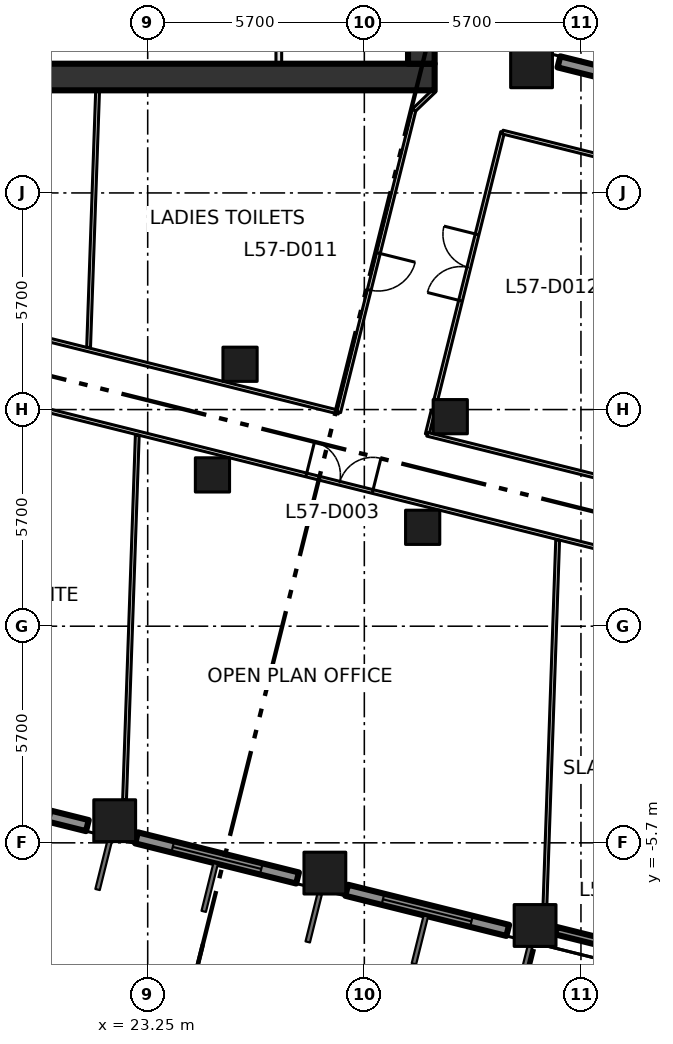
"""IFC4 building model, lengths in metres.
Left out: names, types, materials, properties, quantities, classifications, styles, units other than length and angle.
Written with IfcOpenShell. Run it as: python <this file> out.ifc"""

import sys

from ifc_helpers import new_model, si_unit, direction, frame, frame_2d, origin, origin_2d, place, context, subcontext, project, spatial, rectangle, extrude, element, fill, save


model = new_model("IFC4")
c1 = context("Model", 3, precision=1e-05, world=origin(), true_north=direction((0.0, 1.0)))
c2 = subcontext(c1, "Body", "Model", "MODEL_VIEW")
j1 = project(units=[si_unit("LENGTHUNIT", "METRE"), si_unit("PLANEANGLEUNIT", "RADIAN")], contexts=[c1])
p1 = place(None, origin())
s1 = spatial("IfcSite", under=j1, at=p1, CompositionType="ELEMENT")
p2 = place(p1, origin())
s2 = spatial("IfcBuilding", under=s1, at=p2, CompositionType="ELEMENT")
p3 = place(p2, frame((0.0, 0.0, 250.8)))
s3 = spatial("IfcBuildingStorey", under=s2, at=p3, CompositionType="ELEMENT", Elevation=250.8)
for number, where, z_axis, x_axis in (
    (1, (33.35, 14.719, 0.0), (0.0, 0.0, 1.0), (1.0, 0.0, 0.0)),
    (2, (22.382, -5.117, 0.0), (0.0, 0.0, 1.0), (1.0, 0.0, 0.0)),
    (3, (27.912, -6.496, 0.0), (0.0, 0.0, 1.0), (1.0, 0.0, 0.0)),
    (4, (33.443, -7.875, 0.0), (0.0, 0.0, 1.0), (1.0, 0.0, 0.0)),
):
    element("IfcColumn", number, at=place(p3, frame(where, z_axis=z_axis, x_axis=x_axis)), inside=s3, PredefinedType="COLUMN", context=c2, shape_type="SweptSolid", body=[
        extrude(rectangle(XDim=1.1, YDim=1.1, at=origin_2d()), origin(), (0.0, 0.0, 1.0), 4.2),
    ])
for number, where, z_axis, x_axis in (
    (5, (24.954, 3.981, 0.0), (0.0, 0.0, 1.0), (1.0, 0.0, 0.0)),
    (6, (30.485, 2.602, 0.0), (0.0, 0.0, 1.0), (1.0, 0.0, 0.0)),
    (7, (25.68, 6.892, 0.0), (0.0, 0.0, 1.0), (1.0, 0.0, 0.0)),
    (8, (31.211, 5.513, 0.0), (0.0, 0.0, 1.0), (1.0, 0.0, 0.0)),
):
    element("IfcColumn", number, at=place(p3, frame(where, z_axis=z_axis, x_axis=x_axis)), inside=s3, PredefinedType="COLUMN", context=c2, shape_type="SweptSolid", body=[
        extrude(rectangle(XDim=0.9, YDim=0.9, at=origin_2d()), origin(), (0.0, 0.0, 1.0), 4.2),
    ])
p4 = place(p3, frame((8.0, 14.45, -0.3), z_axis=(0.0, 0.0, 1.0), x_axis=(1.0, 0.0, 0.0)))
e9 = element("IfcWall", 9, at=p4, inside=s3, PredefinedType="SHEAR", context=c2, shape_type="SweptSolid", body=[
    extrude(rectangle(XDim=22.8, YDim=0.7, at=frame_2d((11.4, 0.0))), origin(), (0.0, 0.0, 1.0), 4.2),
])
p5 = place(p4, frame((2.3, 0.0, 0.3)))
e10 = element("IfcOpeningElement", 10, at=p5, cuts=e9, PredefinedType="OPENING", context=c2, shape_type="SweptSolid", body=[
    extrude(rectangle(XDim=1.8, YDim=2.1, at=frame_2d((0.9, 1.05))), frame((0.0, 0.36, 0.0), z_axis=(0.0, -1.0, 0.0), x_axis=(1.0, 0.0, 0.0)), (0.0, 0.0, 1.0), 0.72),
])
p6 = place(p3, frame((30.45, 14.8, -0.3), z_axis=(0.0, 0.0, 1.0), x_axis=(0.0, 1.0, 0.0)))
e11 = element("IfcWall", 11, at=p6, inside=s3, PredefinedType="SHEAR", context=c2, shape_type="SweptSolid", body=[
    extrude(rectangle(XDim=20.9, YDim=0.7, at=frame_2d((10.45, 0.0))), origin(), (0.0, 0.0, 1.0), 4.2),
])
p7 = place(p3, frame((26.7, 14.8, 0.0), z_axis=(0.0, 0.0, 1.0), x_axis=(0.0, 1.0, 0.0)))
e12 = element("IfcWall", 12, at=p7, inside=s3, PredefinedType="PARTITIONING", context=c2, shape_type="SweptSolid", body=[
    extrude(rectangle(XDim=2.825, YDim=0.15, at=frame_2d((1.413, 0.0))), origin(), (0.0, 0.0, 1.0), 3.9),
])
p8 = place(p3, frame((38.307, 13.793, 0.0), z_axis=(0.0, 0.0, 1.0), x_axis=(-0.970306725873, 0.241877774353, 0.0)))
e13 = element("IfcWall", 13, at=p8, inside=s3, PredefinedType="SOLIDWALL", context=c2, shape_type="SweptSolid", body=[
    extrude(rectangle(XDim=4.366, YDim=0.3, at=frame_2d((2.183, 0.0))), origin(), (0.0, 0.0, 1.0), 3.15),
])
p9 = place(p8, frame((0.983, 0.0, 0.8)))
e14 = element("IfcOpeningElement", 14, at=p9, cuts=e13, PredefinedType="OPENING", context=c2, shape_type="SweptSolid", body=[
    extrude(rectangle(XDim=2.4, YDim=2.1, at=frame_2d((1.2, 1.05))), frame((0.0, 0.16, 0.0), z_axis=(0.0, -1.0, 0.0), x_axis=(1.0, 0.0, 0.0)), (0.0, 0.0, 1.0), 0.32),
])
p10 = place(p3, frame((17.425, -4.19, 0.0), z_axis=(0.0, 0.0, 1.0), x_axis=(0.970270592847, -0.242022677978, 0.0)))
e15 = element("IfcWall", 15, at=p10, inside=s3, PredefinedType="SOLIDWALL", context=c2, shape_type="SweptSolid", body=[
    extrude(rectangle(XDim=4.368, YDim=0.3, at=frame_2d((2.184, 0.0))), origin(), (0.0, 0.0, 1.0), 3.15),
])
p11 = place(p10, frame((0.983, 0.0, 0.8)))
e16 = element("IfcOpeningElement", 16, at=p11, cuts=e15, PredefinedType="OPENING", context=c2, shape_type="SweptSolid", body=[
    extrude(rectangle(XDim=2.4, YDim=2.1, at=frame_2d((1.2, 1.05))), frame((0.0, 0.16, 0.0), z_axis=(0.0, -1.0, 0.0), x_axis=(1.0, 0.0, 0.0)), (0.0, 0.0, 1.0), 0.32),
])
p12 = place(p3, frame((22.956, -5.569, 0.0), z_axis=(0.0, 0.0, 1.0), x_axis=(0.970323116569, -0.241812012628, 0.0)))
e17 = element("IfcWall", 17, at=p12, inside=s3, PredefinedType="SOLIDWALL", context=c2, shape_type="SweptSolid", body=[
    extrude(rectangle(XDim=4.367, YDim=0.3, at=frame_2d((2.183, 0.0))), origin(), (0.0, 0.0, 1.0), 3.15),
])
p13 = place(p12, frame((0.983, 0.0, 0.8)))
e18 = element("IfcOpeningElement", 18, at=p13, cuts=e17, PredefinedType="OPENING", context=c2, shape_type="SweptSolid", body=[
    extrude(rectangle(XDim=2.4, YDim=2.1, at=frame_2d((1.2, 1.05))), frame((0.0, 0.16, 0.0), z_axis=(0.0, -1.0, 0.0), x_axis=(1.0, 0.0, 0.0)), (0.0, 0.0, 1.0), 0.32),
])
p14 = place(p3, frame((28.486, -6.948, 0.0), z_axis=(0.0, 0.0, 1.0), x_axis=(0.970336189295, -0.241759549438, 0.0)))
e19 = element("IfcWall", 19, at=p14, inside=s3, PredefinedType="SOLIDWALL", context=c2, shape_type="SweptSolid", body=[
    extrude(rectangle(XDim=4.368, YDim=0.3, at=frame_2d((2.184, 0.0))), origin(), (0.0, 0.0, 1.0), 3.15),
])
p15 = place(p14, frame((0.983, 0.0, 0.8)))
e20 = element("IfcOpeningElement", 20, at=p15, cuts=e19, PredefinedType="OPENING", context=c2, shape_type="SweptSolid", body=[
    extrude(rectangle(XDim=2.4, YDim=2.1, at=frame_2d((1.2, 1.05))), frame((0.0, 0.16, 0.0), z_axis=(0.0, -1.0, 0.0), x_axis=(1.0, 0.0, 0.0)), (0.0, 0.0, 1.0), 0.32),
])
p16 = place(p3, frame((33.993, -8.012, 0.0), z_axis=(0.0, 0.0, 1.0), x_axis=(0.970337166083, -0.241755628927, 0.0)))
e21 = element("IfcWall", 21, at=p16, inside=s3, PredefinedType="SOLIDWALL", context=c2, shape_type="SweptSolid", body=[
    extrude(rectangle(XDim=4.567, YDim=0.2, at=frame_2d((2.283, 0.0))), origin(), (0.0, 0.0, 1.0), 3.15),
])
p17 = place(p16, frame((1.383, 0.0, 0.0)))
e22 = element("IfcOpeningElement", 22, at=p17, cuts=e21, PredefinedType="OPENING", context=c2, shape_type="SweptSolid", body=[
    extrude(rectangle(XDim=1.8, YDim=2.9, at=frame_2d((0.9, 1.45))), frame((0.0, 0.11, 0.0), z_axis=(0.0, -1.0, 0.0), x_axis=(1.0, 0.0, 0.0)), (0.0, 0.0, 1.0), 0.22),
])
p18 = place(p3, frame((8.55, 8.685, 0.0), z_axis=(0.0, 0.0, 1.0), x_axis=(0.970298026101, -0.241912671319, 0.0)))
e23 = element("IfcWall", 23, at=p18, inside=s3, PredefinedType="PARTITIONING", context=c2, shape_type="SweptSolid", body=[
    extrude(rectangle(XDim=51.275, YDim=0.1, at=frame_2d((25.637, 0.0))), origin(), (0.0, 0.0, 1.0), 3.9),
])
p19 = place(p18, frame((19.45, 0.0, 0.0)))
e24 = element("IfcOpeningElement", 24, at=p19, cuts=e23, PredefinedType="OPENING", context=c2, shape_type="SweptSolid", body=[
    extrude(rectangle(XDim=1.8, YDim=2.1, at=frame_2d((0.9, 1.05))), frame((0.0, 0.06, 0.0), z_axis=(0.0, -1.0, 0.0), x_axis=(1.0, 0.0, 0.0)), (0.0, 0.0, 1.0), 0.12),
])
p20 = place(p18, frame((31.35, 0.0, 0.0)))
e25 = element("IfcOpeningElement", 25, at=p20, cuts=e23, PredefinedType="OPENING", context=c2, shape_type="SweptSolid", body=[
    extrude(rectangle(XDim=1.8, YDim=2.1, at=frame_2d((0.9, 1.05))), frame((0.0, 0.06, 0.0), z_axis=(0.0, -1.0, 0.0), x_axis=(1.0, 0.0, 0.0)), (0.0, 0.0, 1.0), 0.12),
])
p21 = place(p18, frame((6.18, 0.0, 0.0)))
e26 = element("IfcOpeningElement", 26, at=p21, cuts=e23, PredefinedType="OPENING", context=c2, shape_type="SweptSolid", body=[
    extrude(rectangle(XDim=1.8, YDim=2.1, at=frame_2d((0.9, 1.05))), frame((0.0, 0.06, 0.0), z_axis=(0.0, -1.0, 0.0), x_axis=(1.0, 0.0, 0.0)), (0.0, 0.0, 1.0), 0.12),
])
p22 = place(p3, frame((8.988, 10.44, 0.0), z_axis=(0.0, 0.0, 1.0), x_axis=(0.970301223092, -0.241899848006, 0.0)))
e27 = element("IfcWall", 27, at=p22, inside=s3, PredefinedType="PARTITIONING", context=c2, shape_type="SweptSolid", body=[
    extrude(rectangle(XDim=19.879, YDim=0.1, at=frame_2d((9.94, 0.0))), origin(), (0.0, 0.0, 1.0), 3.9),
])
p23 = place(p3, frame((30.259, 13.583, 0.0), z_axis=(0.0, 0.0, 1.0), x_axis=(-0.241841612879, -0.970315739479, 0.0)))
e28 = element("IfcWall", 28, at=p23, inside=s3, PredefinedType="PARTITIONING", context=c2, shape_type="SweptSolid", body=[
    extrude(rectangle(XDim=8.195, YDim=0.1, at=frame_2d((4.098, 0.0))), origin(), (0.0, 0.0, 1.0), 3.9),
])
p24 = place(p23, frame((3.88, 0.0, 0.0)))
e29 = element("IfcOpeningElement", 29, at=p24, cuts=e28, PredefinedType="OPENING", context=c2, shape_type="SweptSolid", body=[
    extrude(rectangle(XDim=1.0, YDim=2.1, at=frame_2d((0.5, 1.05))), frame((0.0, 0.06, 0.0), z_axis=(0.0, -1.0, 0.0), x_axis=(1.0, 0.0, 0.0)), (0.0, 0.0, 1.0), 0.12),
])
p25 = place(p3, frame((30.605, 5.05, 0.0), z_axis=(0.0, 0.0, 1.0), x_axis=(0.241823201882, 0.970320328052, 0.0)))
e30 = element("IfcWall", 30, at=p25, inside=s3, PredefinedType="PARTITIONING", context=c2, shape_type="SweptSolid", body=[
    extrude(rectangle(XDim=0.645, YDim=0.1, at=frame_2d((0.323, 0.0))), origin(), (0.0, 0.0, 1.0), 3.9),
])
p26 = place(p3, frame((30.8, 14.1, 0.0), z_axis=(0.0, 0.0, 1.0), x_axis=(-0.722911025189, -0.690941133281, 0.0)))
e31 = element("IfcWall", 31, at=p26, inside=s3, PredefinedType="PARTITIONING", context=c2, shape_type="SweptSolid", body=[
    extrude(rectangle(XDim=0.748, YDim=0.1, at=frame_2d((0.374, 0.0))), origin(), (0.0, 0.0, 1.0), 3.9),
])
p27 = place(p3, frame((30.833, 5.963, 0.0), z_axis=(0.0, 0.0, 1.0), x_axis=(0.241902093757, 0.970300663215, 0.0)))
e32 = element("IfcWall", 32, at=p27, inside=s3, PredefinedType="PARTITIONING", context=c2, shape_type="SweptSolid", body=[
    extrude(rectangle(XDim=7.255, YDim=0.1, at=frame_2d((3.627, 0.0))), origin(), (0.0, 0.0, 1.0), 3.9),
])
p28 = place(p27, frame((2.68, 0.0, 0.0)))
e33 = element("IfcOpeningElement", 33, at=p28, cuts=e32, PredefinedType="OPENING", context=c2, shape_type="SweptSolid", body=[
    extrude(rectangle(XDim=1.8, YDim=2.1, at=frame_2d((0.9, 1.05))), frame((0.0, 0.06, 0.0), z_axis=(0.0, -1.0, 0.0), x_axis=(1.0, 0.0, 0.0)), (0.0, 0.0, 1.0), 0.12),
])
p29 = place(p3, frame((32.588, 13.002, 0.0), z_axis=(0.0, 0.0, 1.0), x_axis=(0.970294555223, -0.241926592387, 0.0)))
e34 = element("IfcWall", 34, at=p29, inside=s3, PredefinedType="PARTITIONING", context=c2, shape_type="SweptSolid", body=[
    extrude(rectangle(XDim=19.526, YDim=0.1, at=frame_2d((9.763, 0.0))), origin(), (0.0, 0.0, 1.0), 3.9),
])
p30 = place(p3, frame((49.551, 0.327, 0.0), z_axis=(0.0, 0.0, 1.0), x_axis=(-0.970303359745, 0.241891277369, 0.0)))
e35 = element("IfcWall", 35, at=p30, inside=s3, PredefinedType="PARTITIONING", context=c2, shape_type="SweptSolid", body=[
    extrude(rectangle(XDim=19.526, YDim=0.1, at=frame_2d((9.763, 0.0))), origin(), (0.0, 0.0, 1.0), 3.9),
])
p31 = place(p3, frame((21.695, 7.334, 0.0), z_axis=(0.0, 0.0, 1.0), x_axis=(0.034978942342, 0.999388049555, 0.0)))
e36 = element("IfcWall", 36, at=p31, inside=s3, PredefinedType="PARTITIONING", context=c2, shape_type="SweptSolid", body=[
    extrude(rectangle(XDim=6.77, YDim=0.1, at=frame_2d((3.385, 0.0))), origin(), (0.0, 0.0, 1.0), 3.9),
])
p32 = place(p3, frame((22.641, -4.567, 0.0), z_axis=(0.0, 0.0, 1.0), x_axis=(0.034896781654, 0.999390921827, 0.0)))
e37 = element("IfcWall", 37, at=p32, inside=s3, PredefinedType="PARTITIONING", context=c2, shape_type="SweptSolid", body=[
    extrude(rectangle(XDim=9.599, YDim=0.1, at=frame_2d((4.799, 0.0))), origin(), (0.0, 0.0, 1.0), 3.9),
])
p33 = place(p3, frame((33.703, -7.325, 0.0), z_axis=(0.0, 0.0, 1.0), x_axis=(0.034823224935, 0.999393487574, 0.0)))
e38 = element("IfcWall", 38, at=p33, inside=s3, PredefinedType="PARTITIONING", context=c2, shape_type="SweptSolid", body=[
    extrude(rectangle(XDim=9.598, YDim=0.1, at=frame_2d((4.799, 0.0))), origin(), (0.0, 0.0, 1.0), 3.9),
])
p34 = place(p13, origin())
e39 = element("IfcWindow", 39, at=p34, inside=s3, PartitioningType="DOUBLE_PANEL_VERTICAL", PredefinedType="WINDOW", context=c2, shape_type="SweptSolid", body=[
    extrude(rectangle(XDim=2.4, YDim=2.1, at=frame_2d((1.2, 1.05))), frame((0.0, 0.03, 0.0), z_axis=(0.0, -1.0, 0.0), x_axis=(1.0, 0.0, 0.0)), (0.0, 0.0, 1.0), 0.06),
])
fill(e18, e39)
p35 = place(p15, origin())
e40 = element("IfcWindow", 40, at=p35, inside=s3, PartitioningType="DOUBLE_PANEL_VERTICAL", PredefinedType="WINDOW", context=c2, shape_type="SweptSolid", body=[
    extrude(rectangle(XDim=2.4, YDim=2.1, at=frame_2d((1.2, 1.05))), frame((0.0, 0.03, 0.0), z_axis=(0.0, -1.0, 0.0), x_axis=(1.0, 0.0, 0.0)), (0.0, 0.0, 1.0), 0.06),
])
fill(e20, e40)
p36 = place(p19, origin())
e41 = element("IfcDoor", 41, at=p36, inside=s3, OperationType="DOUBLE_DOOR_SINGLE_SWING", PredefinedType="DOOR", context=c2, shape_type="SweptSolid", body=[
    extrude(rectangle(XDim=1.8, YDim=2.1, at=frame_2d((0.9, 1.05))), frame((0.0, 0.025, 0.0), z_axis=(0.0, -1.0, 0.0), x_axis=(1.0, 0.0, 0.0)), (0.0, 0.0, 1.0), 0.05),
])
fill(e24, e41)
p37 = place(p24, origin())
e42 = element("IfcDoor", 42, at=p37, inside=s3, OperationType="SINGLE_SWING_LEFT", PredefinedType="DOOR", context=c2, shape_type="SweptSolid", body=[
    extrude(rectangle(XDim=1.0, YDim=2.1, at=frame_2d((0.5, 1.05))), frame((0.0, 0.025, 0.0), z_axis=(0.0, -1.0, 0.0), x_axis=(1.0, 0.0, 0.0)), (0.0, 0.0, 1.0), 0.05),
])
fill(e29, e42)
p38 = place(p28, origin())
e43 = element("IfcDoor", 43, at=p38, inside=s3, OperationType="DOUBLE_DOOR_SINGLE_SWING", PredefinedType="DOOR", context=c2, shape_type="SweptSolid", body=[
    extrude(rectangle(XDim=1.8, YDim=2.1, at=frame_2d((0.9, 1.05))), frame((0.0, 0.025, 0.0), z_axis=(0.0, -1.0, 0.0), x_axis=(1.0, 0.0, 0.0)), (0.0, 0.0, 1.0), 0.05),
])
fill(e33, e43)
save(model, sys.argv[1])
